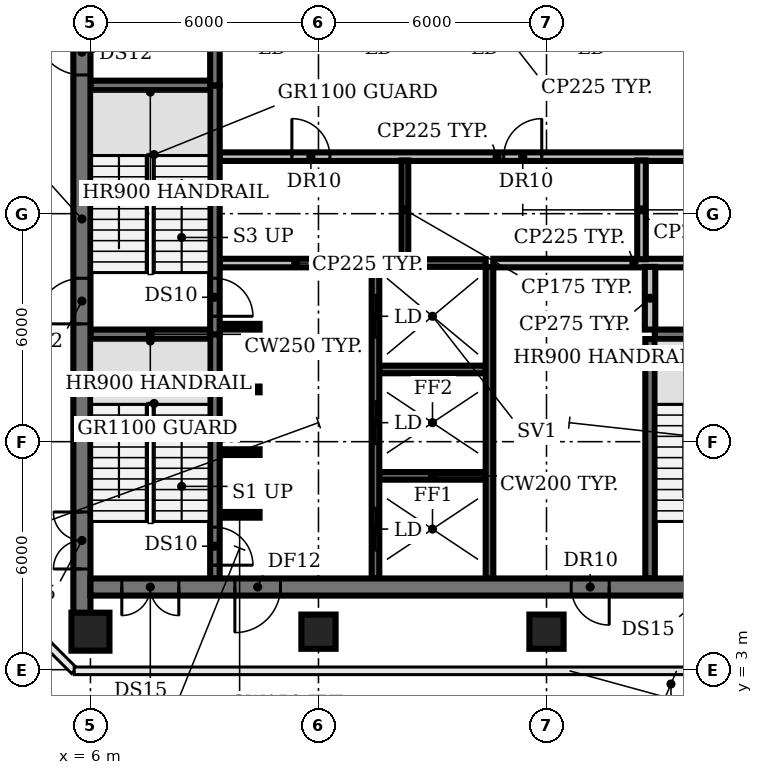
"""IFC4 building model, lengths in metres.
Left out: names, types, materials, properties, quantities, classifications, styles, units other than length and angle.
Written with IfcOpenShell. Run it as: python <this file> out.ifc"""

import sys

from ifc_helpers import new_model, si_unit, direction, frame, frame_2d, origin, origin_2d, place, context, subcontext, project, spatial, rectangle, circle, extrude, element, fill, save


model = new_model("IFC4")
c1 = context("Model", 3, precision=1e-05, world=origin(), true_north=direction((0.0, 1.0)))
c2 = subcontext(c1, "Body", "Model", "MODEL_VIEW")
j1 = project(units=[si_unit("LENGTHUNIT", "METRE"), si_unit("PLANEANGLEUNIT", "RADIAN")], contexts=[c1])
p1 = place(None, origin())
s1 = spatial("IfcSite", under=j1, at=p1, CompositionType="ELEMENT")
p2 = place(p1, origin())
s2 = spatial("IfcBuilding", under=s1, at=p2, CompositionType="ELEMENT")
p3 = place(p2, frame((0.0, 0.0, 251.6)))
s3 = spatial("IfcBuildingStorey", under=s2, at=p3, CompositionType="ELEMENT", Elevation=251.6)
p4 = place(p3, frame((6.0, 4.0, 0.0), z_axis=(0.0, 0.0, 1.0), x_axis=(1.0, 0.0, 0.0)))
e1 = element("IfcColumn", 1, at=p4, inside=s3, PredefinedType="COLUMN", context=c2, shape_type="SweptSolid", body=[
    extrude(circle(Radius=0.5, at=origin_2d()), origin(), (0.0, 0.0, 1.0), 3.2),
])
for number, where, z_axis, x_axis in (
    (2, (12.0, 4.0, 0.0), (0.0, 0.0, 1.0), (1.0, 0.0, 0.0)),
    (3, (18.0, 4.0, 0.0), (0.0, 0.0, 1.0), (1.0, 0.0, 0.0)),
):
    element("IfcColumn", number, at=place(p3, frame(where, z_axis=z_axis, x_axis=x_axis)), inside=s3, PredefinedType="COLUMN", context=c2, shape_type="SweptSolid", body=[
        extrude(rectangle(XDim=0.9, YDim=0.9, at=origin_2d()), origin(), (0.0, 0.0, 1.0), 3.2),
    ])
p5 = place(p3, frame((9.4, 7.075, 0.0), z_axis=(0.0, 0.0, 1.0), x_axis=(1.0, 0.0, 0.0)))
e4 = element("IfcWall", 4, at=p5, inside=s3, PredefinedType="SHEAR", context=c2, shape_type="SweptSolid", body=[
    extrude(rectangle(XDim=1.05, YDim=0.15, at=frame_2d((0.525, 0.0))), origin(), (0.0, 0.0, 1.0), 3.8),
])
p6 = place(p3, frame((13.6, 8.1, 0.0), z_axis=(0.0, 0.0, 1.0), x_axis=(1.0, 0.0, 0.0)))
e5 = element("IfcWall", 5, at=p6, inside=s3, PredefinedType="SHEAR", context=c2, shape_type="SweptSolid", body=[
    extrude(rectangle(XDim=2.8, YDim=0.2, at=frame_2d((1.4, 0.0))), origin(), (0.0, 0.0, 1.0), 3.8),
])
for number, where, z_axis, x_axis in (
    (6, (9.4, 8.725, 0.0), (0.0, 0.0, 1.0), (1.0, 0.0, 0.0)),
    (7, (9.4, 10.375, 0.0), (0.0, 0.0, 1.0), (1.0, 0.0, 0.0)),
):
    element("IfcWall", number, at=place(p3, frame(where, z_axis=z_axis, x_axis=x_axis)), inside=s3, PredefinedType="SHEAR", context=c2, shape_type="SweptSolid", body=[
        extrude(rectangle(XDim=1.05, YDim=0.15, at=frame_2d((0.525, 0.0))), origin(), (0.0, 0.0, 1.0), 3.8),
    ])
p7 = place(p3, frame((13.6, 10.9, 0.0), z_axis=(0.0, 0.0, 1.0), x_axis=(1.0, 0.0, 0.0)))
e8 = element("IfcWall", 8, at=p7, inside=s3, PredefinedType="SHEAR", context=c2, shape_type="SweptSolid", body=[
    extrude(rectangle(XDim=2.8, YDim=0.2, at=frame_2d((1.4, 0.0))), origin(), (0.0, 0.0, 1.0), 3.8),
])
for number, where, z_axis, x_axis in (
    (9, (6.0, 11.825, 0.0), (0.0, 0.0, 1.0), (1.0, 0.0, 0.0)),
    (10, (20.85, 11.825, 0.0), (0.0, 0.0, 1.0), (1.0, 0.0, 0.0)),
):
    element("IfcWall", number, at=place(p3, frame(where, z_axis=z_axis, x_axis=x_axis)), inside=s3, PredefinedType="SHEAR", context=c2, shape_type="SweptSolid", body=[
        extrude(rectangle(XDim=3.15, YDim=0.25, at=frame_2d((1.575, 0.0))), origin(), (0.0, 0.0, 1.0), 3.8),
    ])
p8 = place(p3, frame((9.4, 12.025, 0.0), z_axis=(0.0, 0.0, 1.0), x_axis=(1.0, 0.0, 0.0)))
e11 = element("IfcWall", 11, at=p8, inside=s3, PredefinedType="SHEAR", context=c2, shape_type="SweptSolid", body=[
    extrude(rectangle(XDim=1.05, YDim=0.15, at=frame_2d((0.525, 0.0))), origin(), (0.0, 0.0, 1.0), 3.8),
])
p9 = place(p3, frame((9.4, 13.7, 0.0), z_axis=(0.0, 0.0, 1.0), x_axis=(1.0, 0.0, 0.0)))
e12 = element("IfcWall", 12, at=p9, inside=s3, PredefinedType="PARTITIONING", context=c2, shape_type="SweptSolid", body=[
    extrude(rectangle(XDim=4.0, YDim=0.225, at=frame_2d((2.0, 0.0))), origin(), (0.0, 0.0, 1.0), 3.8),
])
p10 = place(p3, frame((13.6, 13.7, 0.0), z_axis=(0.0, 0.0, 1.0), x_axis=(1.0, 0.0, 0.0)))
e13 = element("IfcWall", 13, at=p10, inside=s3, PredefinedType="SHEAR", context=c2, shape_type="SweptSolid", body=[
    extrude(rectangle(XDim=2.8, YDim=0.2, at=frame_2d((1.4, 0.0))), origin(), (0.0, 0.0, 1.0), 3.8),
])
p11 = place(p3, frame((16.6, 13.7, 0.0), z_axis=(0.0, 0.0, 1.0), x_axis=(1.0, 0.0, 0.0)))
e14 = element("IfcWall", 14, at=p11, inside=s3, PredefinedType="PARTITIONING", context=c2, shape_type="SweptSolid", body=[
    extrude(rectangle(XDim=7.4, YDim=0.225, at=frame_2d((3.7, 0.0))), origin(), (0.0, 0.0, 1.0), 3.8),
])
p12 = place(p3, frame((9.4, 16.5, 0.0), z_axis=(0.0, 0.0, 1.0), x_axis=(1.0, 0.0, 0.0)))
e15 = element("IfcWall", 15, at=p12, inside=s3, PredefinedType="PARTITIONING", context=c2, shape_type="SweptSolid", body=[
    extrude(rectangle(XDim=14.6, YDim=0.225, at=frame_2d((7.3, 0.0))), origin(), (0.0, 0.0, 1.0), 3.8),
])
p13 = place(p12, frame((1.9, 0.0, 0.0)))
e16 = element("IfcOpeningElement", 16, at=p13, cuts=e15, PredefinedType="OPENING", context=c2, shape_type="SweptSolid", body=[
    extrude(rectangle(XDim=1.0, YDim=2.1, at=frame_2d((0.5, 1.05))), frame((0.0, 0.123, 0.0), z_axis=(0.0, -1.0, 0.0), x_axis=(1.0, 0.0, 0.0)), (0.0, 0.0, 1.0), 0.245),
])
p14 = place(p12, frame((7.475, 0.0, 0.0)))
e17 = element("IfcOpeningElement", 17, at=p14, cuts=e15, PredefinedType="OPENING", context=c2, shape_type="SweptSolid", body=[
    extrude(rectangle(XDim=1.0, YDim=2.1, at=frame_2d((0.5, 1.05))), frame((0.0, 0.123, 0.0), z_axis=(0.0, -1.0, 0.0), x_axis=(1.0, 0.0, 0.0)), (0.0, 0.0, 1.0), 0.245),
])
p15 = place(p12, frame((12.4, 0.0, 0.0)))
e18 = element("IfcOpeningElement", 18, at=p15, cuts=e15, PredefinedType="OPENING", context=c2, shape_type="SweptSolid", body=[
    extrude(rectangle(XDim=1.0, YDim=2.1, at=frame_2d((0.5, 1.05))), frame((0.0, 0.123, 0.0), z_axis=(0.0, -1.0, 0.0), x_axis=(1.0, 0.0, 0.0)), (0.0, 0.0, 1.0), 0.245),
])
p16 = place(p3, frame((6.0, 18.375, 0.0), z_axis=(0.0, 0.0, 1.0), x_axis=(1.0, 0.0, 0.0)))
e19 = element("IfcWall", 19, at=p16, inside=s3, PredefinedType="SHEAR", context=c2, shape_type="SweptSolid", body=[
    extrude(rectangle(XDim=3.15, YDim=0.25, at=frame_2d((1.575, 0.0))), origin(), (0.0, 0.0, 1.0), 3.8),
])
p17 = place(p3, frame((9.275, 11.825, 0.0), z_axis=(0.0, 0.0, 1.0), x_axis=(0.0, -1.0, 0.0)))
e20 = element("IfcWall", 20, at=p17, inside=s3, PredefinedType="SHEAR", context=c2, shape_type="SweptSolid", body=[
    extrude(rectangle(XDim=6.425, YDim=0.25, at=frame_2d((3.212, 0.0))), origin(), (0.0, 0.0, 1.0), 3.8),
])
p18 = place(p17, frame((5.075, 0.0, 0.0)))
e21 = element("IfcOpeningElement", 21, at=p18, cuts=e20, PredefinedType="OPENING", context=c2, shape_type="SweptSolid", body=[
    extrude(rectangle(XDim=1.0, YDim=2.1, at=frame_2d((0.5, 1.05))), frame((0.0, 0.135, 0.0), z_axis=(0.0, -1.0, 0.0), x_axis=(1.0, 0.0, 0.0)), (0.0, 0.0, 1.0), 0.27),
])
p19 = place(p3, frame((9.275, 18.375, 0.0), z_axis=(0.0, 0.0, 1.0), x_axis=(0.0, -1.0, 0.0)))
e22 = element("IfcWall", 22, at=p19, inside=s3, PredefinedType="SHEAR", context=c2, shape_type="SweptSolid", body=[
    extrude(rectangle(XDim=6.55, YDim=0.25, at=frame_2d((3.275, 0.0))), origin(), (0.0, 0.0, 1.0), 3.8),
])
p20 = place(p19, frame((5.075, 0.0, 0.0)))
e23 = element("IfcOpeningElement", 23, at=p20, cuts=e22, PredefinedType="OPENING", context=c2, shape_type="SweptSolid", body=[
    extrude(rectangle(XDim=1.0, YDim=2.1, at=frame_2d((0.5, 1.05))), frame((0.0, 0.135, 0.0), z_axis=(0.0, -1.0, 0.0), x_axis=(1.0, 0.0, 0.0)), (0.0, 0.0, 1.0), 0.27),
])
p21 = place(p3, frame((9.275, 18.375, 0.0), z_axis=(0.0, 0.0, 1.0), x_axis=(0.0, 1.0, 0.0)))
e24 = element("IfcWall", 24, at=p21, inside=s3, PredefinedType="SHEAR", context=c2, shape_type="SweptSolid", body=[
    extrude(rectangle(XDim=6.425, YDim=0.25, at=frame_2d((3.212, 0.0))), origin(), (0.0, 0.0, 1.0), 3.8),
])
p22 = place(p3, frame((13.5, 5.4, 0.0), z_axis=(0.0, 0.0, 1.0), x_axis=(0.0, 1.0, 0.0)))
e25 = element("IfcWall", 25, at=p22, inside=s3, PredefinedType="SHEAR", context=c2, shape_type="SweptSolid", body=[
    extrude(rectangle(XDim=8.2, YDim=0.2, at=frame_2d((4.1, 0.0))), origin(), (0.0, 0.0, 1.0), 3.8),
])
p23 = place(p22, frame((0.75, 0.0, 0.0)))
e26 = element("IfcOpeningElement", 26, at=p23, cuts=e25, PredefinedType="OPENING", context=c2, shape_type="SweptSolid", body=[
    extrude(rectangle(XDim=1.1, YDim=2.1, at=frame_2d((0.55, 1.05))), frame((0.0, 0.11, 0.0), z_axis=(0.0, -1.0, 0.0), x_axis=(1.0, 0.0, 0.0)), (0.0, 0.0, 1.0), 0.22),
])
p24 = place(p22, frame((3.55, 0.0, 0.0)))
e27 = element("IfcOpeningElement", 27, at=p24, cuts=e25, PredefinedType="OPENING", context=c2, shape_type="SweptSolid", body=[
    extrude(rectangle(XDim=1.1, YDim=2.1, at=frame_2d((0.55, 1.05))), frame((0.0, 0.11, 0.0), z_axis=(0.0, -1.0, 0.0), x_axis=(1.0, 0.0, 0.0)), (0.0, 0.0, 1.0), 0.22),
])
p25 = place(p22, frame((6.35, 0.0, 0.0)))
e28 = element("IfcOpeningElement", 28, at=p25, cuts=e25, PredefinedType="OPENING", context=c2, shape_type="SweptSolid", body=[
    extrude(rectangle(XDim=1.1, YDim=2.1, at=frame_2d((0.55, 1.05))), frame((0.0, 0.11, 0.0), z_axis=(0.0, -1.0, 0.0), x_axis=(1.0, 0.0, 0.0)), (0.0, 0.0, 1.0), 0.22),
])
p26 = place(p3, frame((14.275, 13.8, 0.0), z_axis=(0.0, 0.0, 1.0), x_axis=(0.0, 1.0, 0.0)))
e29 = element("IfcWall", 29, at=p26, inside=s3, PredefinedType="PARTITIONING", context=c2, shape_type="SweptSolid", body=[
    extrude(rectangle(XDim=2.6, YDim=0.175, at=frame_2d((1.3, 0.0))), origin(), (0.0, 0.0, 1.0), 3.8),
])
p27 = place(p3, frame((16.5, 5.4, 0.0), z_axis=(0.0, 0.0, 1.0), x_axis=(0.0, 1.0, 0.0)))
e30 = element("IfcWall", 30, at=p27, inside=s3, PredefinedType="SHEAR", context=c2, shape_type="SweptSolid", body=[
    extrude(rectangle(XDim=8.2, YDim=0.2, at=frame_2d((4.1, 0.0))), origin(), (0.0, 0.0, 1.0), 3.8),
])
p28 = place(p3, frame((20.5, 13.8, 0.0), z_axis=(0.0, 0.0, 1.0), x_axis=(0.0, 1.0, 0.0)))
e31 = element("IfcWall", 31, at=p28, inside=s3, PredefinedType="PARTITIONING", context=c2, shape_type="SweptSolid", body=[
    extrude(rectangle(XDim=2.6, YDim=0.225, at=frame_2d((1.3, 0.0))), origin(), (0.0, 0.0, 1.0), 3.8),
])
p29 = place(p3, frame((20.725, 5.4, 0.0), z_axis=(0.0, 0.0, 1.0), x_axis=(0.0, 1.0, 0.0)))
e32 = element("IfcWall", 32, at=p29, inside=s3, PredefinedType="SHEAR", context=c2, shape_type="SweptSolid", body=[
    extrude(rectangle(XDim=6.3, YDim=0.25, at=frame_2d((3.15, 0.0))), origin(), (0.0, 0.0, 1.0), 3.8),
])
p30 = place(p3, frame((20.725, 11.95, 0.0), z_axis=(0.0, 0.0, 1.0), x_axis=(0.0, 1.0, 0.0)))
e33 = element("IfcWall", 33, at=p30, inside=s3, PredefinedType="PARTITIONING", context=c2, shape_type="SweptSolid", body=[
    extrude(rectangle(XDim=1.65, YDim=0.275, at=frame_2d((0.825, 0.0))), origin(), (0.0, 0.0, 1.0), 3.8),
])
p31 = place(p3, frame((5.775, 4.47, 0.0), z_axis=(0.0, 0.0, 1.0), x_axis=(0.0, 1.0, 0.0)))
e34 = element("IfcWall", 34, at=p31, inside=s3, PredefinedType="SHEAR", context=c2, shape_type="SweptSolid", body=[
    extrude(rectangle(XDim=20.78, YDim=0.45, at=frame_2d((10.39, 0.0))), origin(), (0.0, 0.0, 1.0), 3.8),
])
p32 = place(p31, frame((1.18, 0.0, 0.0)))
e35 = element("IfcOpeningElement", 35, at=p32, cuts=e34, PredefinedType="OPENING", context=c2, shape_type="SweptSolid", body=[
    extrude(rectangle(XDim=1.5, YDim=2.1, at=frame_2d((0.75, 1.05))), frame((0.0, 0.235, 0.0), z_axis=(0.0, -1.0, 0.0), x_axis=(1.0, 0.0, 0.0)), (0.0, 0.0, 1.0), 0.47),
])
p33 = place(p31, frame((7.63, 0.0, 0.0)))
e36 = element("IfcOpeningElement", 36, at=p33, cuts=e34, PredefinedType="OPENING", context=c2, shape_type="SweptSolid", body=[
    extrude(rectangle(XDim=1.2, YDim=2.1, at=frame_2d((0.6, 1.05))), frame((0.0, 0.235, 0.0), z_axis=(0.0, -1.0, 0.0), x_axis=(1.0, 0.0, 0.0)), (0.0, 0.0, 1.0), 0.47),
])
p34 = place(p31, frame((14.18, 0.0, 0.0)))
e37 = element("IfcOpeningElement", 37, at=p34, cuts=e34, PredefinedType="OPENING", context=c2, shape_type="SweptSolid", body=[
    extrude(rectangle(XDim=1.2, YDim=2.1, at=frame_2d((0.6, 1.05))), frame((0.0, 0.235, 0.0), z_axis=(0.0, -1.0, 0.0), x_axis=(1.0, 0.0, 0.0)), (0.0, 0.0, 1.0), 0.47),
])
p35 = place(p3, frame((24.0, 5.175, 0.0), z_axis=(0.0, 0.0, 1.0), x_axis=(-1.0, 0.0, 0.0)))
e38 = element("IfcWall", 38, at=p35, inside=s3, PredefinedType="SHEAR", context=c2, shape_type="SweptSolid", body=[
    extrude(rectangle(XDim=18.0, YDim=0.45, at=frame_2d((9.0, 0.0))), origin(), (0.0, 0.0, 1.0), 3.8),
])
p36 = place(p35, frame((0.825, 0.0, 0.0)))
e39 = element("IfcOpeningElement", 39, at=p36, cuts=e38, PredefinedType="OPENING", context=c2, shape_type="SweptSolid", body=[
    extrude(rectangle(XDim=1.5, YDim=2.1, at=frame_2d((0.75, 1.05))), frame((0.0, 0.235, 0.0), z_axis=(0.0, -1.0, 0.0), x_axis=(1.0, 0.0, 0.0)), (0.0, 0.0, 1.0), 0.47),
])
p37 = place(p35, frame((15.675, 0.0, 0.0)))
e40 = element("IfcOpeningElement", 40, at=p37, cuts=e38, PredefinedType="OPENING", context=c2, shape_type="SweptSolid", body=[
    extrude(rectangle(XDim=1.5, YDim=2.1, at=frame_2d((0.75, 1.05))), frame((0.0, 0.235, 0.0), z_axis=(0.0, -1.0, 0.0), x_axis=(1.0, 0.0, 0.0)), (0.0, 0.0, 1.0), 0.47),
])
p38 = place(p35, frame((13.0, 0.0, 0.0)))
e41 = element("IfcOpeningElement", 41, at=p38, cuts=e38, PredefinedType="OPENING", context=c2, shape_type="SweptSolid", body=[
    extrude(rectangle(XDim=1.2, YDim=2.1, at=frame_2d((0.6, 1.05))), frame((0.0, 0.235, 0.0), z_axis=(0.0, -1.0, 0.0), x_axis=(1.0, 0.0, 0.0)), (0.0, 0.0, 1.0), 0.47),
])
p39 = place(p35, frame((4.35, 0.0, 0.0)))
e42 = element("IfcOpeningElement", 42, at=p39, cuts=e38, PredefinedType="OPENING", context=c2, shape_type="SweptSolid", body=[
    extrude(rectangle(XDim=1.0, YDim=2.1, at=frame_2d((0.5, 1.05))), frame((0.0, 0.235, 0.0), z_axis=(0.0, -1.0, 0.0), x_axis=(1.0, 0.0, 0.0)), (0.0, 0.0, 1.0), 0.47),
])
p40 = place(p13, origin())
e43 = element("IfcDoor", 43, at=p40, inside=s3, OperationType="SINGLE_SWING_LEFT", PredefinedType="DOOR", context=c2, shape_type="SweptSolid", body=[
    extrude(rectangle(XDim=1.0, YDim=2.1, at=frame_2d((0.5, 1.05))), frame((0.0, 0.025, 0.0), z_axis=(0.0, -1.0, 0.0), x_axis=(1.0, 0.0, 0.0)), (0.0, 0.0, 1.0), 0.05),
])
fill(e16, e43)
p41 = place(p14, origin())
e44 = element("IfcDoor", 44, at=p41, inside=s3, OperationType="SINGLE_SWING_RIGHT", PredefinedType="DOOR", context=c2, shape_type="SweptSolid", body=[
    extrude(rectangle(XDim=1.0, YDim=2.1, at=frame_2d((0.5, 1.05))), frame((0.0, 0.025, 0.0), z_axis=(0.0, -1.0, 0.0), x_axis=(1.0, 0.0, 0.0)), (0.0, 0.0, 1.0), 0.05),
])
fill(e17, e44)
p42 = place(p18, origin())
e45 = element("IfcDoor", 45, at=p42, inside=s3, OperationType="SINGLE_SWING_RIGHT", PredefinedType="DOOR", context=c2, shape_type="SweptSolid", body=[
    extrude(rectangle(XDim=1.0, YDim=2.1, at=frame_2d((0.5, 1.05))), frame((0.0, 0.025, 0.0), z_axis=(0.0, -1.0, 0.0), x_axis=(1.0, 0.0, 0.0)), (0.0, 0.0, 1.0), 0.05),
])
fill(e21, e45)
p43 = place(p20, origin())
e46 = element("IfcDoor", 46, at=p43, inside=s3, OperationType="SINGLE_SWING_RIGHT", PredefinedType="DOOR", context=c2, shape_type="SweptSolid", body=[
    extrude(rectangle(XDim=1.0, YDim=2.1, at=frame_2d((0.5, 1.05))), frame((0.0, 0.025, 0.0), z_axis=(0.0, -1.0, 0.0), x_axis=(1.0, 0.0, 0.0)), (0.0, 0.0, 1.0), 0.05),
])
fill(e23, e46)
p44 = place(p23, origin())
e47 = element("IfcDoor", 47, at=p44, inside=s3, OperationType="DOUBLE_DOOR_SLIDING", PredefinedType="DOOR", context=c2, shape_type="SweptSolid", body=[
    extrude(rectangle(XDim=1.1, YDim=2.1, at=frame_2d((0.55, 1.05))), frame((0.0, 0.025, 0.0), z_axis=(0.0, -1.0, 0.0), x_axis=(1.0, 0.0, 0.0)), (0.0, 0.0, 1.0), 0.05),
])
fill(e26, e47)
p45 = place(p24, origin())
e48 = element("IfcDoor", 48, at=p45, inside=s3, OperationType="DOUBLE_DOOR_SLIDING", PredefinedType="DOOR", context=c2, shape_type="SweptSolid", body=[
    extrude(rectangle(XDim=1.1, YDim=2.1, at=frame_2d((0.55, 1.05))), frame((0.0, 0.025, 0.0), z_axis=(0.0, -1.0, 0.0), x_axis=(1.0, 0.0, 0.0)), (0.0, 0.0, 1.0), 0.05),
])
fill(e27, e48)
p46 = place(p25, origin())
e49 = element("IfcDoor", 49, at=p46, inside=s3, OperationType="DOUBLE_DOOR_SLIDING", PredefinedType="DOOR", context=c2, shape_type="SweptSolid", body=[
    extrude(rectangle(XDim=1.1, YDim=2.1, at=frame_2d((0.55, 1.05))), frame((0.0, 0.025, 0.0), z_axis=(0.0, -1.0, 0.0), x_axis=(1.0, 0.0, 0.0)), (0.0, 0.0, 1.0), 0.05),
])
fill(e28, e49)
p47 = place(p32, origin())
e50 = element("IfcDoor", 50, at=p47, inside=s3, OperationType="DOUBLE_DOOR_SINGLE_SWING", PredefinedType="DOOR", context=c2, shape_type="SweptSolid", body=[
    extrude(rectangle(XDim=1.5, YDim=2.1, at=frame_2d((0.75, 1.05))), frame((0.0, 0.025, 0.0), z_axis=(0.0, -1.0, 0.0), x_axis=(1.0, 0.0, 0.0)), (0.0, 0.0, 1.0), 0.05),
])
fill(e35, e50)
p48 = place(p33, origin())
e51 = element("IfcDoor", 51, at=p48, inside=s3, OperationType="SINGLE_SWING_LEFT", PredefinedType="DOOR", context=c2, shape_type="SweptSolid", body=[
    extrude(rectangle(XDim=1.2, YDim=2.1, at=frame_2d((0.6, 1.05))), frame((0.0, 0.025, 0.0), z_axis=(0.0, -1.0, 0.0), x_axis=(1.0, 0.0, 0.0)), (0.0, 0.0, 1.0), 0.05),
])
fill(e36, e51)
p49 = place(p34, origin())
e52 = element("IfcDoor", 52, at=p49, inside=s3, OperationType="SINGLE_SWING_RIGHT", PredefinedType="DOOR", context=c2, shape_type="SweptSolid", body=[
    extrude(rectangle(XDim=1.2, YDim=2.1, at=frame_2d((0.6, 1.05))), frame((0.0, 0.025, 0.0), z_axis=(0.0, -1.0, 0.0), x_axis=(1.0, 0.0, 0.0)), (0.0, 0.0, 1.0), 0.05),
])
fill(e37, e52)
p50 = place(p37, origin())
e53 = element("IfcDoor", 53, at=p50, inside=s3, OperationType="DOUBLE_DOOR_SINGLE_SWING", PredefinedType="DOOR", context=c2, shape_type="SweptSolid", body=[
    extrude(rectangle(XDim=1.5, YDim=2.1, at=frame_2d((0.75, 1.05))), frame((0.0, 0.025, 0.0), z_axis=(0.0, -1.0, 0.0), x_axis=(1.0, 0.0, 0.0)), (0.0, 0.0, 1.0), 0.05),
])
fill(e40, e53)
p51 = place(p38, origin())
e54 = element("IfcDoor", 54, at=p51, inside=s3, OperationType="SINGLE_SWING_RIGHT", PredefinedType="DOOR", context=c2, shape_type="SweptSolid", body=[
    extrude(rectangle(XDim=1.2, YDim=2.1, at=frame_2d((0.6, 1.05))), frame((0.0, 0.025, 0.0), z_axis=(0.0, -1.0, 0.0), x_axis=(1.0, 0.0, 0.0)), (0.0, 0.0, 1.0), 0.05),
])
fill(e41, e54)
p52 = place(p39, origin())
e55 = element("IfcDoor", 55, at=p52, inside=s3, OperationType="SINGLE_SWING_LEFT", PredefinedType="DOOR", context=c2, shape_type="SweptSolid", body=[
    extrude(rectangle(XDim=1.0, YDim=2.1, at=frame_2d((0.5, 1.05))), frame((0.0, 0.025, 0.0), z_axis=(0.0, -1.0, 0.0), x_axis=(1.0, 0.0, 0.0)), (0.0, 0.0, 1.0), 0.05),
])
fill(e42, e55)
save(model, sys.argv[1])
